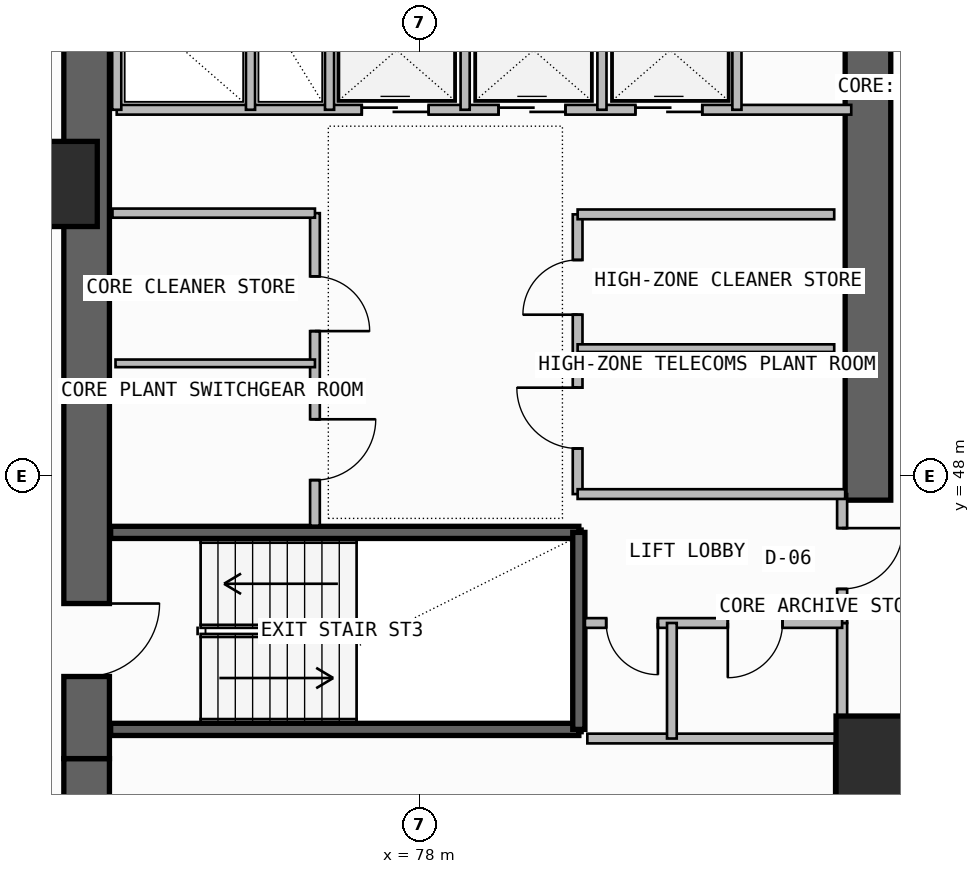
"""IFC4 building model, lengths in metres.
Left out: names, types, materials, properties, quantities, classifications, styles, units other than length and angle.
Written with IfcOpenShell. Run it as: python <this file> out.ifc"""

import sys

from ifc_helpers import new_model, si_unit, direction, frame, frame_2d, origin, origin_2d, place, context, subcontext, project, spatial, rectangle, extrude, element, fill, save


model = new_model("IFC4")
c1 = context("Model", 3, precision=1e-05, world=origin(), true_north=direction((0.0, 1.0)))
c2 = subcontext(c1, "Body", "Model", "MODEL_VIEW")
j1 = project(units=[si_unit("LENGTHUNIT", "METRE"), si_unit("PLANEANGLEUNIT", "RADIAN")], contexts=[c1])
p1 = place(None, origin())
s1 = spatial("IfcSite", under=j1, at=p1, CompositionType="ELEMENT")
p2 = place(p1, origin())
s2 = spatial("IfcBuilding", under=s1, at=p2, CompositionType="ELEMENT")
p3 = place(p2, frame((0.0, 0.0, 204.42)))
s3 = spatial("IfcBuildingStorey", under=s2, at=p3, CompositionType="ELEMENT", Elevation=204.42)
p4 = place(p3, frame((72.525, 35.5, -0.26), z_axis=(0.0, 0.0, 1.0), x_axis=(0.0, 1.0, 0.0)))
e1 = element("IfcWall", 1, at=p4, inside=s3, PredefinedType="SHEAR", context=c2, shape_type="SweptSolid", body=[
    extrude(rectangle(XDim=7.85, YDim=0.75, at=frame_2d((3.925, 0.0))), origin(), (0.0, 0.0, 1.0), 3.52),
])
p5 = place(p4, frame((1.45, 0.0, 0.26)))
e2 = element("IfcOpeningElement", 2, at=p5, cuts=e1, PredefinedType="OPENING", context=c2, shape_type="SweptSolid", body=[
    extrude(rectangle(XDim=1.2, YDim=2.2, at=frame_2d((0.6, 1.1))), frame((0.0, 0.385, 0.0), z_axis=(0.0, -1.0, 0.0), x_axis=(1.0, 0.0, 0.0)), (0.0, 0.0, 1.0), 0.77),
])
p6 = place(p3, frame((72.525, 43.35, -0.26), z_axis=(0.0, 0.0, 1.0), x_axis=(0.0, 1.0, 0.0)))
e3 = element("IfcWall", 3, at=p6, inside=s3, PredefinedType="SHEAR", context=c2, shape_type="SweptSolid", body=[
    extrude(rectangle(XDim=12.7, YDim=0.75, at=frame_2d((6.35, 0.0))), origin(), (0.0, 0.0, 1.0), 3.52),
])
p7 = place(p6, frame((1.35, 0.0, 0.26)))
e4 = element("IfcOpeningElement", 4, at=p7, cuts=e3, PredefinedType="OPENING", context=c2, shape_type="SweptSolid", body=[
    extrude(rectangle(XDim=1.2, YDim=2.2, at=frame_2d((0.6, 1.1))), frame((0.0, 0.385, 0.0), z_axis=(0.0, -1.0, 0.0), x_axis=(1.0, 0.0, 0.0)), (0.0, 0.0, 1.0), 0.77),
])
p8 = place(p3, frame((85.375, 47.6, -0.26), z_axis=(0.0, 0.0, 1.0), x_axis=(0.0, 1.0, 0.0)))
e5 = element("IfcWall", 5, at=p8, inside=s3, PredefinedType="SHEAR", context=c2, shape_type="SweptSolid", body=[
    extrude(rectangle(XDim=8.45, YDim=0.75, at=frame_2d((4.225, 0.0))), origin(), (0.0, 0.0, 1.0), 3.52),
])
for number, where, z_axis, x_axis in (
    (6, (85.55, 43.35, 0.0), (0.0, 0.0, 1.0), (1.0, 0.0, 0.0)),
    (7, (72.0, 52.8, 0.0), (0.0, 0.0, 1.0), (1.0, 0.0, 0.0)),
):
    element("IfcColumn", number, at=place(p3, frame(where, z_axis=z_axis, x_axis=x_axis)), inside=s3, PredefinedType="COLUMN", context=c2, shape_type="SweptSolid", body=[
        extrude(rectangle(XDim=1.4, YDim=1.4, at=origin_2d()), origin(), (0.0, 0.0, 1.0), 3.52),
    ])
p9 = place(p3, frame((84.92, 38.85, 0.0), z_axis=(0.0, 0.0, 1.0), x_axis=(0.0, 1.0, 0.0)))
e8 = element("IfcWall", 8, at=p9, inside=s3, PredefinedType="SOLIDWALL", context=c2, shape_type="SweptSolid", body=[
    extrude(rectangle(XDim=4.83, YDim=0.2, at=frame_2d((2.415, 0.0))), origin(), (0.0, 0.0, 1.0), 3.26),
])
p10 = place(p9, frame((1.25, 0.0, 0.0)))
e9 = element("IfcOpeningElement", 9, at=p10, cuts=e8, PredefinedType="OPENING", context=c2, shape_type="SweptSolid", body=[
    extrude(rectangle(XDim=1.1, YDim=2.2, at=frame_2d((0.55, 1.1))), frame((0.0, 0.11, 0.0), z_axis=(0.0, -1.0, 0.0), x_axis=(1.0, 0.0, 0.0)), (0.0, 0.0, 1.0), 0.22),
])
for number, where, z_axis, x_axis in (
    (10, (72.92, 43.83, -0.26), (0.0, 0.0, 1.0), (1.0, 0.0, 0.0)),
    (11, (72.92, 47.07, -0.26), (0.0, 0.0, 1.0), (1.0, 0.0, 0.0)),
):
    element("IfcWall", number, at=place(p3, frame(where, z_axis=z_axis, x_axis=x_axis)), inside=s3, PredefinedType="SOLIDWALL", context=c2, shape_type="SweptSolid", body=[
        extrude(rectangle(XDim=7.7, YDim=0.2, at=frame_2d((3.85, 0.0))), origin(), (0.0, 0.0, 1.0), 3.52),
    ])
p11 = place(p3, frame((80.62, 43.83, -0.26), z_axis=(0.0, 0.0, 1.0), x_axis=(0.0, 1.0, 0.0)))
e12 = element("IfcWall", 12, at=p11, inside=s3, PredefinedType="SOLIDWALL", context=c2, shape_type="SweptSolid", body=[
    extrude(rectangle(XDim=3.24, YDim=0.2, at=frame_2d((1.62, 0.0))), origin(), (0.0, 0.0, 1.0), 3.52),
])
p12 = place(p3, frame((84.95, 43.68, 0.0), z_axis=(0.0, 0.0, 1.0), x_axis=(0.0, 1.0, 0.0)))
e13 = element("IfcWall", 13, at=p12, inside=s3, PredefinedType="PLUMBINGWALL", context=c2, shape_type="SweptSolid", body=[
    extrude(rectangle(XDim=1.9, YDim=0.165, at=frame_2d((0.95, 0.0))), origin(), (0.0, 0.0, 1.0), 3.26),
])
p13 = place(p3, frame((84.95, 45.58, 0.0), z_axis=(0.0, 0.0, 1.0), x_axis=(0.0, 1.0, 0.0)))
e14 = element("IfcWall", 14, at=p13, inside=s3, PredefinedType="PARTITIONING", context=c2, shape_type="SweptSolid", body=[
    extrude(rectangle(XDim=2.12, YDim=0.165, at=frame_2d((1.06, 0.0))), origin(), (0.0, 0.0, 1.0), 3.26),
])
p14 = place(p13, frame((0.56, 0.0, 0.0)))
e15 = element("IfcOpeningElement", 15, at=p14, cuts=e14, PredefinedType="OPENING", context=c2, shape_type="SweptSolid", body=[
    extrude(rectangle(XDim=1.0, YDim=2.2, at=frame_2d((0.5, 1.1))), frame((0.0, 0.093, 0.0), z_axis=(0.0, -1.0, 0.0), x_axis=(1.0, 0.0, 0.0)), (0.0, 0.0, 1.0), 0.185),
])
p15 = place(p3, frame((80.72, 45.58, 0.0), z_axis=(0.0, 0.0, 1.0), x_axis=(1.0, 0.0, 0.0)))
e16 = element("IfcWall", 16, at=p15, inside=s3, PredefinedType="PLUMBINGWALL", context=c2, shape_type="SweptSolid", body=[
    extrude(rectangle(XDim=4.23, YDim=0.16, at=frame_2d((2.115, 0.0))), origin(), (0.0, 0.0, 1.0), 3.26),
])
p16 = place(p15, frame((0.35, 0.0, 0.0)))
e17 = element("IfcOpeningElement", 17, at=p16, cuts=e16, PredefinedType="OPENING", context=c2, shape_type="SweptSolid", body=[
    extrude(rectangle(XDim=0.85, YDim=2.05, at=frame_2d((0.425, 1.025))), frame((0.0, 0.09, 0.0), z_axis=(0.0, -1.0, 0.0), x_axis=(1.0, 0.0, 0.0)), (0.0, 0.0, 1.0), 0.18),
])
p17 = place(p15, frame((2.35, 0.0, 0.0)))
e18 = element("IfcOpeningElement", 18, at=p17, cuts=e16, PredefinedType="OPENING", context=c2, shape_type="SweptSolid", body=[
    extrude(rectangle(XDim=0.9, YDim=2.1, at=frame_2d((0.45, 1.05))), frame((0.0, 0.09, 0.0), z_axis=(0.0, -1.0, 0.0), x_axis=(1.0, 0.0, 0.0)), (0.0, 0.0, 1.0), 0.18),
])
p18 = place(p3, frame((80.76, 43.68, 0.0), z_axis=(0.0, 0.0, 1.0), x_axis=(1.0, 0.0, 0.0)))
e19 = element("IfcWall", 19, at=p18, inside=s3, PredefinedType="PLUMBINGWALL", context=c2, shape_type="SweptSolid", body=[
    extrude(rectangle(XDim=4.19, YDim=0.16, at=frame_2d((2.095, 0.0))), origin(), (0.0, 0.0, 1.0), 3.26),
])
p19 = place(p3, frame((82.15, 43.68, 0.0), z_axis=(0.0, 0.0, 1.0), x_axis=(0.0, 1.0, 0.0)))
e20 = element("IfcWall", 20, at=p19, inside=s3, PredefinedType="PLUMBINGWALL", context=c2, shape_type="SweptSolid", body=[
    extrude(rectangle(XDim=1.9, YDim=0.16, at=frame_2d((0.95, 0.0))), origin(), (0.0, 0.0, 1.0), 3.26),
])
p20 = place(p3, frame((76.28, 47.18, 0.0), z_axis=(0.0, 0.0, 1.0), x_axis=(0.0, 1.0, 0.0)))
e21 = element("IfcWall", 21, at=p20, inside=s3, PredefinedType="SOLIDWALL", context=c2, shape_type="SweptSolid", body=[
    extrude(rectangle(XDim=5.14, YDim=0.16, at=frame_2d((2.57, 0.0))), origin(), (0.0, 0.0, 1.0), 3.26),
])
p21 = place(p20, frame((0.75, 0.0, 0.0)))
e22 = element("IfcOpeningElement", 22, at=p21, cuts=e21, PredefinedType="OPENING", context=c2, shape_type="SweptSolid", body=[
    extrude(rectangle(XDim=1.0, YDim=2.2, at=frame_2d((0.5, 1.1))), frame((0.0, 0.09, 0.0), z_axis=(0.0, -1.0, 0.0), x_axis=(1.0, 0.0, 0.0)), (0.0, 0.0, 1.0), 0.18),
])
p22 = place(p20, frame((3.2, 0.0, 0.0)))
e23 = element("IfcOpeningElement", 23, at=p22, cuts=e21, PredefinedType="OPENING", context=c2, shape_type="SweptSolid", body=[
    extrude(rectangle(XDim=0.9, YDim=2.1, at=frame_2d((0.45, 1.05))), frame((0.0, 0.09, 0.0), z_axis=(0.0, -1.0, 0.0), x_axis=(1.0, 0.0, 0.0)), (0.0, 0.0, 1.0), 0.18),
])
p23 = place(p3, frame((72.95, 52.32, 0.0), z_axis=(0.0, 0.0, 1.0), x_axis=(1.0, 0.0, 0.0)))
e24 = element("IfcWall", 24, at=p23, inside=s3, PredefinedType="SOLIDWALL", context=c2, shape_type="SweptSolid", body=[
    extrude(rectangle(XDim=3.33, YDim=0.15, at=frame_2d((1.665, 0.0))), origin(), (0.0, 0.0, 1.0), 3.26),
])
p24 = place(p3, frame((73.0, 49.85, 0.0), z_axis=(0.0, 0.0, 1.0), x_axis=(1.0, 0.0, 0.0)))
e25 = element("IfcWall", 25, at=p24, inside=s3, PredefinedType="PARTITIONING", context=c2, shape_type="SweptSolid", body=[
    extrude(rectangle(XDim=3.28, YDim=0.125, at=frame_2d((1.64, 0.0))), origin(), (0.0, 0.0, 1.0), 3.26),
])
p25 = place(p3, frame((80.6, 47.7, 0.0), z_axis=(0.0, 0.0, 1.0), x_axis=(0.0, 1.0, 0.0)))
e26 = element("IfcWall", 26, at=p25, inside=s3, PredefinedType="SOLIDWALL", context=c2, shape_type="SweptSolid", body=[
    extrude(rectangle(XDim=4.6, YDim=0.16, at=frame_2d((2.3, 0.0))), origin(), (0.0, 0.0, 1.0), 3.26),
])
p26 = place(p25, frame((0.75, 0.0, 0.0)))
e27 = element("IfcOpeningElement", 27, at=p26, cuts=e26, PredefinedType="OPENING", context=c2, shape_type="SweptSolid", body=[
    extrude(rectangle(XDim=1.0, YDim=2.2, at=frame_2d((0.5, 1.1))), frame((0.0, 0.09, 0.0), z_axis=(0.0, -1.0, 0.0), x_axis=(1.0, 0.0, 0.0)), (0.0, 0.0, 1.0), 0.18),
])
p27 = place(p25, frame((2.95, 0.0, 0.0)))
e28 = element("IfcOpeningElement", 28, at=p27, cuts=e26, PredefinedType="OPENING", context=c2, shape_type="SweptSolid", body=[
    extrude(rectangle(XDim=0.9, YDim=2.1, at=frame_2d((0.45, 1.05))), frame((0.0, 0.09, 0.0), z_axis=(0.0, -1.0, 0.0), x_axis=(1.0, 0.0, 0.0)), (0.0, 0.0, 1.0), 0.18),
])
p28 = place(p3, frame((80.6, 47.7, 0.0), z_axis=(0.0, 0.0, 1.0), x_axis=(1.0, 0.0, 0.0)))
e29 = element("IfcWall", 29, at=p28, inside=s3, PredefinedType="SOLIDWALL", context=c2, shape_type="SweptSolid", body=[
    extrude(rectangle(XDim=4.4, YDim=0.16, at=frame_2d((2.2, 0.0))), origin(), (0.0, 0.0, 1.0), 3.26),
])
p29 = place(p3, frame((80.6, 52.3, 0.0), z_axis=(0.0, 0.0, 1.0), x_axis=(1.0, 0.0, 0.0)))
e30 = element("IfcWall", 30, at=p29, inside=s3, PredefinedType="SOLIDWALL", context=c2, shape_type="SweptSolid", body=[
    extrude(rectangle(XDim=4.22, YDim=0.16, at=frame_2d((2.11, 0.0))), origin(), (0.0, 0.0, 1.0), 3.26),
])
p30 = place(p3, frame((80.6, 50.1, 0.0), z_axis=(0.0, 0.0, 1.0), x_axis=(1.0, 0.0, 0.0)))
e31 = element("IfcWall", 31, at=p30, inside=s3, PredefinedType="PARTITIONING", context=c2, shape_type="SweptSolid", body=[
    extrude(rectangle(XDim=4.22, YDim=0.125, at=frame_2d((2.11, 0.0))), origin(), (0.0, 0.0, 1.0), 3.26),
])
p31 = place(p3, frame((73.02, 54.02, 0.0), z_axis=(0.0, 0.0, 1.0), x_axis=(1.0, 0.0, 0.0)))
e32 = element("IfcWall", 32, at=p31, inside=s3, PredefinedType="SOLIDWALL", context=c2, shape_type="SweptSolid", body=[
    extrude(rectangle(XDim=12.08, YDim=0.16, at=frame_2d((6.04, 0.0))), origin(), (0.0, 0.0, 1.0), 3.26),
])
p32 = place(p31, frame((4.03, 0.0, 0.0)))
e33 = element("IfcOpeningElement", 33, at=p32, cuts=e32, PredefinedType="OPENING", context=c2, shape_type="SweptSolid", body=[
    extrude(rectangle(XDim=1.1, YDim=2.25, at=frame_2d((0.55, 1.125))), frame((0.0, 0.09, 0.0), z_axis=(0.0, -1.0, 0.0), x_axis=(1.0, 0.0, 0.0)), (0.0, 0.0, 1.0), 0.18),
])
p33 = place(p31, frame((6.28, 0.0, 0.0)))
e34 = element("IfcOpeningElement", 34, at=p33, cuts=e32, PredefinedType="OPENING", context=c2, shape_type="SweptSolid", body=[
    extrude(rectangle(XDim=1.1, YDim=2.25, at=frame_2d((0.55, 1.125))), frame((0.0, 0.09, 0.0), z_axis=(0.0, -1.0, 0.0), x_axis=(1.0, 0.0, 0.0)), (0.0, 0.0, 1.0), 0.18),
])
p34 = place(p31, frame((8.53, 0.0, 0.0)))
e35 = element("IfcOpeningElement", 35, at=p34, cuts=e32, PredefinedType="OPENING", context=c2, shape_type="SweptSolid", body=[
    extrude(rectangle(XDim=1.1, YDim=2.25, at=frame_2d((0.55, 1.125))), frame((0.0, 0.09, 0.0), z_axis=(0.0, -1.0, 0.0), x_axis=(1.0, 0.0, 0.0)), (0.0, 0.0, 1.0), 0.18),
])
p35 = place(p3, frame((73.02, 54.02, 0.0), z_axis=(0.0, 0.0, 1.0), x_axis=(0.0, 1.0, 0.0)))
e36 = element("IfcWall", 36, at=p35, inside=s3, PredefinedType="PLUMBINGWALL", context=c2, shape_type="SweptSolid", body=[
    extrude(rectangle(XDim=1.94, YDim=0.15, at=frame_2d((0.97, 0.0))), origin(), (0.0, 0.0, 1.0), 3.26),
])
p36 = place(p3, frame((76.52, 54.02, 0.0), z_axis=(0.0, 0.0, 1.0), x_axis=(0.0, 1.0, 0.0)))
e37 = element("IfcWall", 37, at=p36, inside=s3, PredefinedType="SOLIDWALL", context=c2, shape_type="SweptSolid", body=[
    extrude(rectangle(XDim=1.94, YDim=0.15, at=frame_2d((0.97, 0.0))), origin(), (0.0, 0.0, 1.0), 3.26),
])
p37 = place(p3, frame((75.22, 54.02, 0.0), z_axis=(0.0, 0.0, 1.0), x_axis=(0.0, 1.0, 0.0)))
e38 = element("IfcWall", 38, at=p37, inside=s3, PredefinedType="PLUMBINGWALL", context=c2, shape_type="SweptSolid", body=[
    extrude(rectangle(XDim=1.94, YDim=0.15, at=frame_2d((0.97, 0.0))), origin(), (0.0, 0.0, 1.0), 3.26),
])
for number, where, z_axis, x_axis in (
    (39, (78.75, 54.02, 0.0), (0.0, 0.0, 1.0), (0.0, 1.0, 0.0)),
    (40, (81.0, 54.02, 0.0), (0.0, 0.0, 1.0), (0.0, 1.0, 0.0)),
):
    element("IfcWall", number, at=place(p3, frame(where, z_axis=z_axis, x_axis=x_axis)), inside=s3, PredefinedType="PLUMBINGWALL", context=c2, shape_type="SweptSolid", body=[
        extrude(rectangle(XDim=1.96, YDim=0.15, at=frame_2d((0.98, 0.0))), origin(), (0.0, 0.0, 1.0), 3.26),
    ])
p38 = place(p3, frame((83.22, 54.02, 0.0), z_axis=(0.0, 0.0, 1.0), x_axis=(0.0, 1.0, 0.0)))
e41 = element("IfcWall", 41, at=p38, inside=s3, PredefinedType="SOLIDWALL", context=c2, shape_type="SweptSolid", body=[
    extrude(rectangle(XDim=1.96, YDim=0.15, at=frame_2d((0.98, 0.0))), origin(), (0.0, 0.0, 1.0), 3.26),
])
p39 = place(p7, frame((1.2, 0.0, 0.0), z_axis=(0.0, 0.0, 1.0), x_axis=(-1.0, 0.0, 0.0)))
e42 = element("IfcDoor", 42, at=p39, inside=s3, OperationType="SINGLE_SWING_LEFT", PredefinedType="USERDEFINED", context=c2, shape_type="SweptSolid", body=[
    extrude(rectangle(XDim=1.2, YDim=2.2, at=frame_2d((0.6, 1.1))), frame((0.0, 0.025, 0.0), z_axis=(0.0, -1.0, 0.0), x_axis=(1.0, 0.0, 0.0)), (0.0, 0.0, 1.0), 0.05),
])
fill(e4, e42)
p40 = place(p14, frame((1.0, 0.0, 0.0), z_axis=(0.0, 0.0, 1.0), x_axis=(-1.0, 0.0, 0.0)))
e43 = element("IfcDoor", 43, at=p40, inside=s3, OperationType="SINGLE_SWING_LEFT", PredefinedType="DOOR", context=c2, shape_type="SweptSolid", body=[
    extrude(rectangle(XDim=1.0, YDim=2.2, at=frame_2d((0.5, 1.1))), frame((0.0, 0.025, 0.0), z_axis=(0.0, -1.0, 0.0), x_axis=(1.0, 0.0, 0.0)), (0.0, 0.0, 1.0), 0.05),
])
fill(e15, e43)
p41 = place(p16, frame((0.85, 0.0, 0.0), z_axis=(0.0, 0.0, 1.0), x_axis=(-1.0, 0.0, 0.0)))
e44 = element("IfcDoor", 44, at=p41, inside=s3, OperationType="SINGLE_SWING_LEFT", PredefinedType="DOOR", context=c2, shape_type="SweptSolid", body=[
    extrude(rectangle(XDim=0.85, YDim=2.05, at=frame_2d((0.425, 1.025))), frame((0.0, 0.025, 0.0), z_axis=(0.0, -1.0, 0.0), x_axis=(1.0, 0.0, 0.0)), (0.0, 0.0, 1.0), 0.05),
])
fill(e17, e44)
p42 = place(p17, frame((0.9, 0.0, 0.0), z_axis=(0.0, 0.0, 1.0), x_axis=(-1.0, 0.0, 0.0)))
e45 = element("IfcDoor", 45, at=p42, inside=s3, OperationType="SINGLE_SWING_RIGHT", PredefinedType="DOOR", context=c2, shape_type="SweptSolid", body=[
    extrude(rectangle(XDim=0.9, YDim=2.1, at=frame_2d((0.45, 1.05))), frame((0.0, 0.025, 0.0), z_axis=(0.0, -1.0, 0.0), x_axis=(1.0, 0.0, 0.0)), (0.0, 0.0, 1.0), 0.05),
])
fill(e18, e45)
p43 = place(p21, frame((1.0, 0.0, 0.0), z_axis=(0.0, 0.0, 1.0), x_axis=(-1.0, 0.0, 0.0)))
e46 = element("IfcDoor", 46, at=p43, inside=s3, OperationType="SINGLE_SWING_LEFT", PredefinedType="DOOR", context=c2, shape_type="SweptSolid", body=[
    extrude(rectangle(XDim=1.0, YDim=2.2, at=frame_2d((0.5, 1.1))), frame((0.0, 0.025, 0.0), z_axis=(0.0, -1.0, 0.0), x_axis=(1.0, 0.0, 0.0)), (0.0, 0.0, 1.0), 0.05),
])
fill(e22, e46)
p44 = place(p22, frame((0.9, 0.0, 0.0), z_axis=(0.0, 0.0, 1.0), x_axis=(-1.0, 0.0, 0.0)))
e47 = element("IfcDoor", 47, at=p44, inside=s3, OperationType="SINGLE_SWING_RIGHT", PredefinedType="DOOR", context=c2, shape_type="SweptSolid", body=[
    extrude(rectangle(XDim=0.9, YDim=2.1, at=frame_2d((0.45, 1.05))), frame((0.0, 0.025, 0.0), z_axis=(0.0, -1.0, 0.0), x_axis=(1.0, 0.0, 0.0)), (0.0, 0.0, 1.0), 0.05),
])
fill(e23, e47)
p45 = place(p26, origin())
e48 = element("IfcDoor", 48, at=p45, inside=s3, OperationType="SINGLE_SWING_RIGHT", PredefinedType="DOOR", context=c2, shape_type="SweptSolid", body=[
    extrude(rectangle(XDim=1.0, YDim=2.2, at=frame_2d((0.5, 1.1))), frame((0.0, 0.025, 0.0), z_axis=(0.0, -1.0, 0.0), x_axis=(1.0, 0.0, 0.0)), (0.0, 0.0, 1.0), 0.05),
])
fill(e27, e48)
p46 = place(p27, origin())
e49 = element("IfcDoor", 49, at=p46, inside=s3, OperationType="SINGLE_SWING_LEFT", PredefinedType="DOOR", context=c2, shape_type="SweptSolid", body=[
    extrude(rectangle(XDim=0.9, YDim=2.1, at=frame_2d((0.45, 1.05))), frame((0.0, 0.025, 0.0), z_axis=(0.0, -1.0, 0.0), x_axis=(1.0, 0.0, 0.0)), (0.0, 0.0, 1.0), 0.05),
])
fill(e28, e49)
p47 = place(p32, origin())
e50 = element("IfcDoor", 50, at=p47, inside=s3, OperationType="DOUBLE_DOOR_SLIDING", PredefinedType="DOOR", context=c2, shape_type="SweptSolid", body=[
    extrude(rectangle(XDim=1.1, YDim=2.25, at=frame_2d((0.55, 1.125))), frame((0.0, 0.025, 0.0), z_axis=(0.0, -1.0, 0.0), x_axis=(1.0, 0.0, 0.0)), (0.0, 0.0, 1.0), 0.05),
])
fill(e33, e50)
p48 = place(p33, origin())
e51 = element("IfcDoor", 51, at=p48, inside=s3, OperationType="DOUBLE_DOOR_SLIDING", PredefinedType="DOOR", context=c2, shape_type="SweptSolid", body=[
    extrude(rectangle(XDim=1.1, YDim=2.25, at=frame_2d((0.55, 1.125))), frame((0.0, 0.025, 0.0), z_axis=(0.0, -1.0, 0.0), x_axis=(1.0, 0.0, 0.0)), (0.0, 0.0, 1.0), 0.05),
])
fill(e34, e51)
p49 = place(p34, origin())
e52 = element("IfcDoor", 52, at=p49, inside=s3, OperationType="DOUBLE_DOOR_SLIDING", PredefinedType="DOOR", context=c2, shape_type="SweptSolid", body=[
    extrude(rectangle(XDim=1.1, YDim=2.25, at=frame_2d((0.55, 1.125))), frame((0.0, 0.025, 0.0), z_axis=(0.0, -1.0, 0.0), x_axis=(1.0, 0.0, 0.0)), (0.0, 0.0, 1.0), 0.05),
])
fill(e35, e52)
save(model, sys.argv[1])
